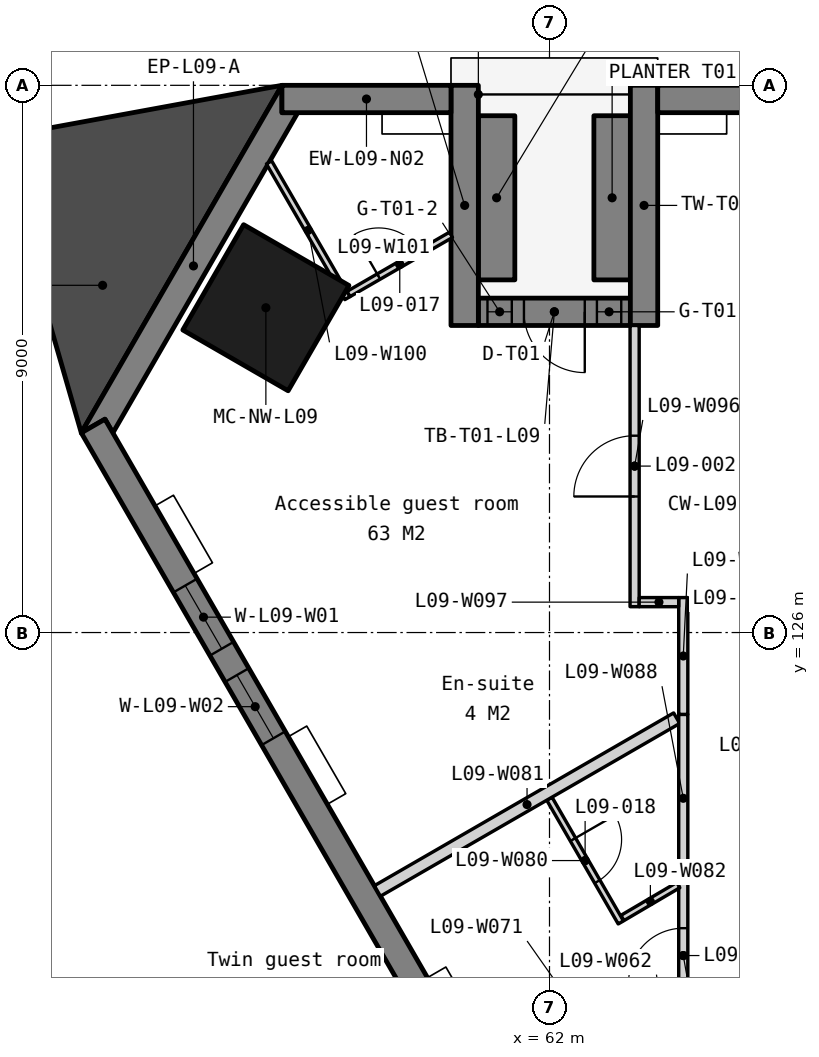
"""IFC4 building model, lengths in metres.
Left out: names, types, materials, properties, quantities, classifications, styles, units other than length and angle.
Written with IfcOpenShell. Run it as: python <this file> out.ifc"""

import sys

from ifc_helpers import new_model, si_unit, direction, frame, frame_2d, origin, origin_2d, place, context, subcontext, project, spatial, polyline, rectangle, outline, extrude, element, fill, save


model = new_model("IFC4")
c1 = context("Model", 3, precision=1e-05, world=origin(), true_north=direction((0.0, 1.0)))
c2 = subcontext(c1, "Body", "Model", "MODEL_VIEW")
j1 = project(units=[si_unit("LENGTHUNIT", "METRE"), si_unit("PLANEANGLEUNIT", "RADIAN")], contexts=[c1])
p1 = place(None, origin())
s1 = spatial("IfcSite", under=j1, at=p1, CompositionType="ELEMENT")
p2 = place(p1, origin())
s2 = spatial("IfcBuilding", under=s1, at=p2, CompositionType="ELEMENT")
p3 = place(p2, frame((0.0, 0.0, 45.5)))
s3 = spatial("IfcBuildingStorey", under=s2, at=p3, CompositionType="ELEMENT", Elevation=45.5)
p4 = place(p3, frame((57.336, 131.342, 0.0), z_axis=(0.0, 0.0, 1.0), x_axis=(-0.5, -0.866025403784, 0.0)))
e1 = element("IfcColumn", 1, at=p4, inside=s3, PredefinedType="COLUMN", context=c2, shape_type="SweptSolid", body=[
    extrude(rectangle(XDim=2.0, YDim=2.0, at=origin_2d()), origin(), (0.0, 0.0, 1.0), 3.5),
])
p5 = place(p3, frame((0.0, 0.0, -0.15)))
e2 = element("IfcWall", 2, at=p5, inside=s3, PredefinedType="SOLIDWALL", context=c2, shape_type="SweptSolid", body=[
    extrude(outline(polyline([(57.6, 135.0), (57.6, 134.55), (57.86, 134.55), (54.82, 129.284), (54.69, 129.509), (54.3, 129.284), (57.6, 135.0)])), origin(), (0.0, 0.0, 1.0), 3.5),
])
p6 = place(p3, frame((102.4, 134.775, -0.15), z_axis=(0.0, 0.0, 1.0), x_axis=(-1.0, 0.0, 0.0)))
e3 = element("IfcWall", 3, at=p6, inside=s3, PredefinedType="SOLIDWALL", context=c2, shape_type="SweptSolid", body=[
    extrude(outline(polyline([(0.0, 0.0), (0.0, 3.5), (38.62, 3.5), (38.62, 0.0), (0.0, 0.0)])), frame((0.0, 0.225, 0.0), z_axis=(0.0, -1.0, 0.0), x_axis=(1.0, 0.0, 0.0)), (0.0, 0.0, 1.0), 0.45),
])
p7 = place(p6, frame((3.03, 0.0, 1.05)))
e4 = element("IfcOpeningElement", 4, at=p7, cuts=e3, PredefinedType="OPENING", context=c2, shape_type="SweptSolid", body=[
    extrude(rectangle(XDim=1.2, YDim=1.5, at=frame_2d((0.6, 0.75))), frame((0.0, 0.235, 0.0), z_axis=(0.0, -1.0, 0.0), x_axis=(1.0, 0.0, 0.0)), (0.0, 0.0, 1.0), 0.47),
])
p8 = place(p6, frame((4.73, 0.0, 1.05)))
e5 = element("IfcOpeningElement", 5, at=p8, cuts=e3, PredefinedType="OPENING", context=c2, shape_type="SweptSolid", body=[
    extrude(rectangle(XDim=1.2, YDim=1.5, at=frame_2d((0.6, 0.75))), frame((0.0, 0.235, 0.0), z_axis=(0.0, -1.0, 0.0), x_axis=(1.0, 0.0, 0.0)), (0.0, 0.0, 1.0), 0.47),
])
p9 = place(p6, frame((11.99, 0.0, 1.05)))
e6 = element("IfcOpeningElement", 6, at=p9, cuts=e3, PredefinedType="OPENING", context=c2, shape_type="SweptSolid", body=[
    extrude(rectangle(XDim=1.2, YDim=1.5, at=frame_2d((0.6, 0.75))), frame((0.0, 0.235, 0.0), z_axis=(0.0, -1.0, 0.0), x_axis=(1.0, 0.0, 0.0)), (0.0, 0.0, 1.0), 0.47),
])
p10 = place(p6, frame((13.69, 0.0, 1.05)))
e7 = element("IfcOpeningElement", 7, at=p10, cuts=e3, PredefinedType="OPENING", context=c2, shape_type="SweptSolid", body=[
    extrude(rectangle(XDim=1.2, YDim=1.5, at=frame_2d((0.6, 0.75))), frame((0.0, 0.235, 0.0), z_axis=(0.0, -1.0, 0.0), x_axis=(1.0, 0.0, 0.0)), (0.0, 0.0, 1.0), 0.47),
])
p11 = place(p6, frame((20.95, 0.0, 1.05)))
e8 = element("IfcOpeningElement", 8, at=p11, cuts=e3, PredefinedType="OPENING", context=c2, shape_type="SweptSolid", body=[
    extrude(rectangle(XDim=1.2, YDim=1.5, at=frame_2d((0.6, 0.75))), frame((0.0, 0.235, 0.0), z_axis=(0.0, -1.0, 0.0), x_axis=(1.0, 0.0, 0.0)), (0.0, 0.0, 1.0), 0.47),
])
p12 = place(p6, frame((22.65, 0.0, 1.05)))
e9 = element("IfcOpeningElement", 9, at=p12, cuts=e3, PredefinedType="OPENING", context=c2, shape_type="SweptSolid", body=[
    extrude(rectangle(XDim=1.2, YDim=1.5, at=frame_2d((0.6, 0.75))), frame((0.0, 0.235, 0.0), z_axis=(0.0, -1.0, 0.0), x_axis=(1.0, 0.0, 0.0)), (0.0, 0.0, 1.0), 0.47),
])
p13 = place(p6, frame((29.91, 0.0, 1.05)))
e10 = element("IfcOpeningElement", 10, at=p13, cuts=e3, PredefinedType="OPENING", context=c2, shape_type="SweptSolid", body=[
    extrude(rectangle(XDim=1.2, YDim=1.5, at=frame_2d((0.6, 0.75))), frame((0.0, 0.235, 0.0), z_axis=(0.0, -1.0, 0.0), x_axis=(1.0, 0.0, 0.0)), (0.0, 0.0, 1.0), 0.47),
])
p14 = place(p6, frame((31.61, 0.0, 1.05)))
e11 = element("IfcOpeningElement", 11, at=p14, cuts=e3, PredefinedType="OPENING", context=c2, shape_type="SweptSolid", body=[
    extrude(rectangle(XDim=1.2, YDim=1.5, at=frame_2d((0.6, 0.75))), frame((0.0, 0.235, 0.0), z_axis=(0.0, -1.0, 0.0), x_axis=(1.0, 0.0, 0.0)), (0.0, 0.0, 1.0), 0.47),
])
p15 = place(p3, frame((60.38, 134.775, -0.15), z_axis=(0.0, 0.0, 1.0), x_axis=(-1.0, 0.0, 0.0)))
e12 = element("IfcWall", 12, at=p15, inside=s3, PredefinedType="SOLIDWALL", context=c2, shape_type="SweptSolid", body=[
    extrude(outline(polyline([(2.78, 3.5), (2.78, 0.0), (0.0, 0.0), (0.0, 3.5), (2.78, 3.5)])), frame((0.0, 0.225, 0.0), z_axis=(0.0, -1.0, 0.0), x_axis=(1.0, 0.0, 0.0)), (0.0, 0.0, 1.0), 0.45),
])
p16 = place(p3, frame((54.495, 129.397, -0.15), z_axis=(0.0, 0.0, 1.0), x_axis=(0.499999201451, -0.866025864826, 0.0)))
e13 = element("IfcWall", 13, at=p16, inside=s3, PredefinedType="SOLIDWALL", context=c2, shape_type="SweptSolid", body=[
    extrude(outline(polyline([(44.8, 0.0), (44.8, 3.5), (0.0, 3.5), (0.0, 0.0), (44.8, 0.0)])), frame((0.0, 0.225, 0.0), z_axis=(0.0, -1.0, 0.0), x_axis=(1.0, 0.0, 0.0)), (0.0, 0.0, 1.0), 0.45),
])
p17 = place(p16, frame((3.03, 0.0, 1.05)))
e14 = element("IfcOpeningElement", 14, at=p17, cuts=e13, PredefinedType="OPENING", context=c2, shape_type="SweptSolid", body=[
    extrude(rectangle(XDim=1.2, YDim=1.5, at=frame_2d((0.6, 0.75))), frame((0.0, 0.235, 0.0), z_axis=(0.0, -1.0, 0.0), x_axis=(1.0, 0.0, 0.0)), (0.0, 0.0, 1.0), 0.47),
])
p18 = place(p16, frame((4.73, 0.0, 1.05)))
e15 = element("IfcOpeningElement", 15, at=p18, cuts=e13, PredefinedType="OPENING", context=c2, shape_type="SweptSolid", body=[
    extrude(rectangle(XDim=1.2, YDim=1.5, at=frame_2d((0.6, 0.75))), frame((0.0, 0.235, 0.0), z_axis=(0.0, -1.0, 0.0), x_axis=(1.0, 0.0, 0.0)), (0.0, 0.0, 1.0), 0.47),
])
p19 = place(p16, frame((11.99, 0.0, 1.05)))
e16 = element("IfcOpeningElement", 16, at=p19, cuts=e13, PredefinedType="OPENING", context=c2, shape_type="SweptSolid", body=[
    extrude(rectangle(XDim=1.2, YDim=1.5, at=frame_2d((0.6, 0.75))), frame((0.0, 0.235, 0.0), z_axis=(0.0, -1.0, 0.0), x_axis=(1.0, 0.0, 0.0)), (0.0, 0.0, 1.0), 0.47),
])
p20 = place(p16, frame((13.69, 0.0, 1.05)))
e17 = element("IfcOpeningElement", 17, at=p20, cuts=e13, PredefinedType="OPENING", context=c2, shape_type="SweptSolid", body=[
    extrude(rectangle(XDim=1.2, YDim=1.5, at=frame_2d((0.6, 0.75))), frame((0.0, 0.235, 0.0), z_axis=(0.0, -1.0, 0.0), x_axis=(1.0, 0.0, 0.0)), (0.0, 0.0, 1.0), 0.47),
])
p21 = place(p16, frame((20.95, 0.0, 1.05)))
e18 = element("IfcOpeningElement", 18, at=p21, cuts=e13, PredefinedType="OPENING", context=c2, shape_type="SweptSolid", body=[
    extrude(rectangle(XDim=1.2, YDim=1.5, at=frame_2d((0.6, 0.75))), frame((0.0, 0.235, 0.0), z_axis=(0.0, -1.0, 0.0), x_axis=(1.0, 0.0, 0.0)), (0.0, 0.0, 1.0), 0.47),
])
p22 = place(p16, frame((22.65, 0.0, 1.05)))
e19 = element("IfcOpeningElement", 19, at=p22, cuts=e13, PredefinedType="OPENING", context=c2, shape_type="SweptSolid", body=[
    extrude(rectangle(XDim=1.2, YDim=1.5, at=frame_2d((0.6, 0.75))), frame((0.0, 0.235, 0.0), z_axis=(0.0, -1.0, 0.0), x_axis=(1.0, 0.0, 0.0)), (0.0, 0.0, 1.0), 0.47),
])
p23 = place(p16, frame((29.91, 0.0, 1.05)))
e20 = element("IfcOpeningElement", 20, at=p23, cuts=e13, PredefinedType="OPENING", context=c2, shape_type="SweptSolid", body=[
    extrude(rectangle(XDim=1.2, YDim=1.5, at=frame_2d((0.6, 0.75))), frame((0.0, 0.235, 0.0), z_axis=(0.0, -1.0, 0.0), x_axis=(1.0, 0.0, 0.0)), (0.0, 0.0, 1.0), 0.47),
])
p24 = place(p16, frame((31.61, 0.0, 1.05)))
e21 = element("IfcOpeningElement", 21, at=p24, cuts=e13, PredefinedType="OPENING", context=c2, shape_type="SweptSolid", body=[
    extrude(rectangle(XDim=1.2, YDim=1.5, at=frame_2d((0.6, 0.75))), frame((0.0, 0.235, 0.0), z_axis=(0.0, -1.0, 0.0), x_axis=(1.0, 0.0, 0.0)), (0.0, 0.0, 1.0), 0.47),
])
p25 = place(p16, frame((38.87, 0.0, 1.05)))
e22 = element("IfcOpeningElement", 22, at=p25, cuts=e13, PredefinedType="OPENING", context=c2, shape_type="SweptSolid", body=[
    extrude(rectangle(XDim=1.2, YDim=1.5, at=frame_2d((0.6, 0.75))), frame((0.0, 0.235, 0.0), z_axis=(0.0, -1.0, 0.0), x_axis=(1.0, 0.0, 0.0)), (0.0, 0.0, 1.0), 0.47),
])
p26 = place(p16, frame((40.57, 0.0, 1.05)))
e23 = element("IfcOpeningElement", 23, at=p26, cuts=e13, PredefinedType="OPENING", context=c2, shape_type="SweptSolid", body=[
    extrude(rectangle(XDim=1.2, YDim=1.5, at=frame_2d((0.6, 0.75))), frame((0.0, 0.235, 0.0), z_axis=(0.0, -1.0, 0.0), x_axis=(1.0, 0.0, 0.0)), (0.0, 0.0, 1.0), 0.47),
])
for number, where, z_axis, x_axis in (
    (24, (63.555, 135.0, 0.0), (0.0, 0.0, 1.0), (0.0, -1.0, 0.0)),
    (25, (60.605, 135.0, 0.0), (0.0, 0.0, 1.0), (0.0, -1.0, 0.0)),
):
    element("IfcWall", number, at=place(p3, frame(where, z_axis=z_axis, x_axis=x_axis)), inside=s3, PredefinedType="SOLIDWALL", context=c2, shape_type="SweptSolid", body=[
        extrude(rectangle(XDim=3.95, YDim=0.45, at=frame_2d((1.975, 0.0))), origin(), (0.0, 0.0, 1.0), 6.85),
    ])
p27 = place(p3, frame((63.33, 131.275, -0.15), z_axis=(0.0, 0.0, 1.0), x_axis=(-1.0, 0.0, 0.0)))
e26 = element("IfcWall", 26, at=p27, inside=s3, PredefinedType="SOLIDWALL", context=c2, shape_type="SweptSolid", body=[
    extrude(rectangle(XDim=2.5, YDim=0.45, at=frame_2d((1.25, 0.0))), origin(), (0.0, 0.0, 1.0), 3.097),
])
p28 = place(p27, frame((0.75, 0.0, 0.15)))
e27 = element("IfcOpeningElement", 27, at=p28, cuts=e26, PredefinedType="OPENING", context=c2, shape_type="SweptSolid", body=[
    extrude(rectangle(XDim=1.0, YDim=2.4, at=frame_2d((0.5, 1.2))), frame((0.0, 0.235, 0.0), z_axis=(0.0, -1.0, 0.0), x_axis=(1.0, 0.0, 0.0)), (0.0, 0.0, 1.0), 0.47),
])
p29 = place(p27, frame((0.15, 0.0, 0.15)))
e28 = element("IfcOpeningElement", 28, at=p29, cuts=e26, PredefinedType="OPENING", context=c2, shape_type="SweptSolid", body=[
    extrude(rectangle(XDim=0.4, YDim=2.4, at=frame_2d((0.2, 1.2))), frame((0.0, 0.235, 0.0), z_axis=(0.0, -1.0, 0.0), x_axis=(1.0, 0.0, 0.0)), (0.0, 0.0, 1.0), 0.47),
])
p30 = place(p27, frame((1.95, 0.0, 0.15)))
e29 = element("IfcOpeningElement", 29, at=p30, cuts=e26, PredefinedType="OPENING", context=c2, shape_type="SweptSolid", body=[
    extrude(rectangle(XDim=0.4, YDim=2.4, at=frame_2d((0.2, 1.2))), frame((0.0, 0.235, 0.0), z_axis=(0.0, -1.0, 0.0), x_axis=(1.0, 0.0, 0.0)), (0.0, 0.0, 1.0), 0.47),
])
for number, where, z_axis, x_axis in (
    (30, (63.03, 134.5, 0.0), (0.0, 0.0, 1.0), (0.0, -1.0, 0.0)),
    (31, (61.13, 134.5, 0.0), (0.0, 0.0, 1.0), (0.0, -1.0, 0.0)),
):
    element("IfcWall", number, at=place(p3, frame(where, z_axis=z_axis, x_axis=x_axis)), inside=s3, PredefinedType="STANDARD", context=c2, shape_type="SweptSolid", body=[
        extrude(rectangle(XDim=2.7, YDim=0.6, at=frame_2d((1.35, 0.0))), origin(), (0.0, 0.0, 1.0), 0.6),
    ])
p31 = place(p3, frame((0.0, 0.0, -0.15)))
e32 = element("IfcWall", 32, at=p31, inside=s3, PredefinedType="SOLIDWALL", context=c2, shape_type="SweptSolid", body=[
    extrude(outline(polyline([(57.6, 135.0), (52.9, 134.137), (54.3, 129.284), (57.6, 135.0)])), origin(), (0.0, 0.0, 1.0), 3.5),
])
p32 = place(p3, frame((64.2, 119.481, 0.0), z_axis=(0.0, 0.0, 1.0), x_axis=(0.0, 1.0, 0.0)))
e33 = element("IfcWall", 33, at=p32, inside=s3, PredefinedType="PARTITIONING", context=c2, shape_type="SweptSolid", body=[
    extrude(rectangle(XDim=2.413, YDim=0.15, at=frame_2d((1.207, 0.0))), origin(), (0.0, 0.0, 1.0), 3.35),
])
p33 = place(p32, frame((0.757, 0.0, 0.0)))
e34 = element("IfcOpeningElement", 34, at=p33, cuts=e33, PredefinedType="OPENING", context=c2, shape_type="SweptSolid", body=[
    extrude(rectangle(XDim=0.9, YDim=2.1, at=frame_2d((0.45, 1.05))), frame((0.0, 0.085, 0.0), z_axis=(0.0, -1.0, 0.0), x_axis=(1.0, 0.0, 0.0)), (0.0, 0.0, 1.0), 0.17),
])
p34 = place(p3, frame((61.998, 123.267, 0.0), z_axis=(0.0, 0.0, 1.0), x_axis=(0.500016218704, -0.866016039709, 0.0)))
e35 = element("IfcWall", 35, at=p34, inside=s3, PredefinedType="PARTITIONING", context=c2, shape_type="SweptSolid", body=[
    extrude(rectangle(XDim=2.35, YDim=0.1, at=frame_2d((1.175, 0.0))), origin(), (0.0, 0.0, 1.0), 3.35),
])
p35 = place(p34, frame((0.775, 0.0, 0.0)))
e36 = element("IfcOpeningElement", 36, at=p35, cuts=e35, PredefinedType="OPENING", context=c2, shape_type="SweptSolid", body=[
    extrude(rectangle(XDim=0.8, YDim=2.1, at=frame_2d((0.4, 1.05))), frame((0.0, 0.06, 0.0), z_axis=(0.0, -1.0, 0.0), x_axis=(1.0, 0.0, 0.0)), (0.0, 0.0, 1.0), 0.12),
])
p36 = place(p3, frame((59.17, 121.75, 0.0), z_axis=(0.0, 0.0, 1.0), x_axis=(0.866043237112, 0.499969110498, 0.0)))
e37 = element("IfcWall", 37, at=p36, inside=s3, PredefinedType="PARTITIONING", context=c2, shape_type="SweptSolid", body=[
    extrude(rectangle(XDim=5.683, YDim=0.2, at=frame_2d((2.842, 0.0))), origin(), (0.0, 0.0, 1.0), 3.35),
])
p37 = place(p3, frame((63.2, 121.306, 0.0), z_axis=(0.0, 0.0, 1.0), x_axis=(0.86196956313, 0.506960030216, 0.0)))
e38 = element("IfcWall", 38, at=p37, inside=s3, PredefinedType="PARTITIONING", context=c2, shape_type="SweptSolid", body=[
    extrude(rectangle(XDim=1.065, YDim=0.1, at=frame_2d((0.533, 0.0))), origin(), (0.0, 0.0, 1.0), 3.35),
])
p38 = place(p3, frame((64.2, 121.894, 0.0), z_axis=(0.0, 0.0, 1.0), x_axis=(0.0, 1.0, 0.0)))
e39 = element("IfcWall", 39, at=p38, inside=s3, PredefinedType="PARTITIONING", context=c2, shape_type="SweptSolid", body=[
    extrude(rectangle(XDim=2.76, YDim=0.15, at=frame_2d((1.38, 0.0))), origin(), (0.0, 0.0, 1.0), 3.35),
])
p39 = place(p3, frame((64.2, 124.654, 0.0), z_axis=(0.0, 0.0, 1.0), x_axis=(0.0, 1.0, 0.0)))
e40 = element("IfcWall", 40, at=p39, inside=s3, PredefinedType="PARTITIONING", context=c2, shape_type="SweptSolid", body=[
    extrude(rectangle(XDim=1.921, YDim=0.15, at=frame_2d((0.96, 0.0))), origin(), (0.0, 0.0, 1.0), 3.35),
])
p40 = place(p3, frame((63.4, 126.425, 0.0), z_axis=(0.0, 0.0, 1.0), x_axis=(0.0, 1.0, 0.0)))
e41 = element("IfcWall", 41, at=p40, inside=s3, PredefinedType="PARTITIONING", context=c2, shape_type="SweptSolid", body=[
    extrude(rectangle(XDim=4.625, YDim=0.15, at=frame_2d((2.312, 0.0))), origin(), (0.0, 0.0, 1.0), 3.35),
])
p41 = place(p40, frame((1.812, 0.0, 0.0)))
e42 = element("IfcOpeningElement", 42, at=p41, cuts=e41, PredefinedType="OPENING", context=c2, shape_type="SweptSolid", body=[
    extrude(rectangle(XDim=1.0, YDim=2.1, at=frame_2d((0.5, 1.05))), frame((0.0, 0.085, 0.0), z_axis=(0.0, -1.0, 0.0), x_axis=(1.0, 0.0, 0.0)), (0.0, 0.0, 1.0), 0.17),
])
p42 = place(p3, frame((63.475, 126.5, 0.0), z_axis=(0.0, 0.0, 1.0), x_axis=(1.0, 0.0, 0.0)))
e43 = element("IfcWall", 43, at=p42, inside=s3, PredefinedType="PARTITIONING", context=c2, shape_type="SweptSolid", body=[
    extrude(rectangle(XDim=0.65, YDim=0.15, at=frame_2d((0.325, 0.0))), origin(), (0.0, 0.0, 1.0), 3.35),
])
p43 = place(p3, frame((57.388, 133.733, 0.0), z_axis=(0.0, 0.0, 1.0), x_axis=(0.499938331893, -0.866061004955, 0.0)))
e44 = element("IfcWall", 44, at=p43, inside=s3, PredefinedType="PARTITIONING", context=c2, shape_type="SweptSolid", body=[
    extrude(rectangle(XDim=2.578, YDim=0.1, at=frame_2d((1.289, 0.0))), origin(), (0.0, 0.0, 1.0), 3.35),
])
p44 = place(p3, frame((58.695, 131.568, 0.0), z_axis=(0.0, 0.0, 1.0), x_axis=(0.865987050215, 0.500066424447, 0.0)))
e45 = element("IfcWall", 45, at=p44, inside=s3, PredefinedType="PARTITIONING", context=c2, shape_type="SweptSolid", body=[
    extrude(rectangle(XDim=1.946, YDim=0.1, at=frame_2d((0.973, 0.0))), origin(), (0.0, 0.0, 1.0), 3.35),
])
p45 = place(p44, frame((0.573, 0.0, 0.0)))
e46 = element("IfcOpeningElement", 46, at=p45, cuts=e45, PredefinedType="OPENING", context=c2, shape_type="SweptSolid", body=[
    extrude(rectangle(XDim=0.8, YDim=2.1, at=frame_2d((0.4, 1.05))), frame((0.0, 0.06, 0.0), z_axis=(0.0, -1.0, 0.0), x_axis=(1.0, 0.0, 0.0)), (0.0, 0.0, 1.0), 0.12),
])
p46 = place(p17, origin())
e47 = element("IfcWindow", 47, at=p46, inside=s3, PartitioningType="SINGLE_PANEL", PredefinedType="WINDOW", context=c2, shape_type="SweptSolid", body=[
    extrude(rectangle(XDim=1.2, YDim=1.5, at=frame_2d((0.6, 0.75))), frame((0.0, 0.03, 0.0), z_axis=(0.0, -1.0, 0.0), x_axis=(1.0, 0.0, 0.0)), (0.0, 0.0, 1.0), 0.06),
])
fill(e14, e47)
p47 = place(p18, origin())
e48 = element("IfcWindow", 48, at=p47, inside=s3, PartitioningType="SINGLE_PANEL", PredefinedType="WINDOW", context=c2, shape_type="SweptSolid", body=[
    extrude(rectangle(XDim=1.2, YDim=1.5, at=frame_2d((0.6, 0.75))), frame((0.0, 0.03, 0.0), z_axis=(0.0, -1.0, 0.0), x_axis=(1.0, 0.0, 0.0)), (0.0, 0.0, 1.0), 0.06),
])
fill(e15, e48)
p48 = place(p28, origin())
e49 = element("IfcDoor", 49, at=p48, inside=s3, OperationType="SINGLE_SWING_LEFT", PredefinedType="DOOR", context=c2, shape_type="SweptSolid", body=[
    extrude(rectangle(XDim=1.0, YDim=2.4, at=frame_2d((0.5, 1.2))), frame((0.0, 0.025, 0.0), z_axis=(0.0, -1.0, 0.0), x_axis=(1.0, 0.0, 0.0)), (0.0, 0.0, 1.0), 0.05),
])
fill(e27, e49)
p49 = place(p29, origin())
e50 = element("IfcWindow", 50, at=p49, inside=s3, PartitioningType="SINGLE_PANEL", PredefinedType="WINDOW", context=c2, shape_type="SweptSolid", body=[
    extrude(rectangle(XDim=0.4, YDim=2.4, at=frame_2d((0.2, 1.2))), frame((0.0, 0.03, 0.0), z_axis=(0.0, -1.0, 0.0), x_axis=(1.0, 0.0, 0.0)), (0.0, 0.0, 1.0), 0.06),
])
fill(e28, e50)
p50 = place(p30, origin())
e51 = element("IfcWindow", 51, at=p50, inside=s3, PartitioningType="SINGLE_PANEL", PredefinedType="WINDOW", context=c2, shape_type="SweptSolid", body=[
    extrude(rectangle(XDim=0.4, YDim=2.4, at=frame_2d((0.2, 1.2))), frame((0.0, 0.03, 0.0), z_axis=(0.0, -1.0, 0.0), x_axis=(1.0, 0.0, 0.0)), (0.0, 0.0, 1.0), 0.06),
])
fill(e29, e51)
p51 = place(p41, origin())
e52 = element("IfcDoor", 52, at=p51, inside=s3, OperationType="SINGLE_SWING_LEFT", PredefinedType="DOOR", context=c2, shape_type="SweptSolid", body=[
    extrude(rectangle(XDim=1.0, YDim=2.1, at=frame_2d((0.5, 1.05))), frame((0.0, 0.025, 0.0), z_axis=(0.0, -1.0, 0.0), x_axis=(1.0, 0.0, 0.0)), (0.0, 0.0, 1.0), 0.05),
])
fill(e42, e52)
p52 = place(p33, origin())
e53 = element("IfcDoor", 53, at=p52, inside=s3, OperationType="SINGLE_SWING_LEFT", PredefinedType="DOOR", context=c2, shape_type="SweptSolid", body=[
    extrude(rectangle(XDim=0.9, YDim=2.1, at=frame_2d((0.45, 1.05))), frame((0.0, 0.025, 0.0), z_axis=(0.0, -1.0, 0.0), x_axis=(1.0, 0.0, 0.0)), (0.0, 0.0, 1.0), 0.05),
])
fill(e34, e53)
p53 = place(p45, origin())
e54 = element("IfcDoor", 54, at=p53, inside=s3, OperationType="SINGLE_SWING_LEFT", PredefinedType="DOOR", context=c2, shape_type="SweptSolid", body=[
    extrude(rectangle(XDim=0.8, YDim=2.1, at=frame_2d((0.4, 1.05))), frame((0.0, 0.025, 0.0), z_axis=(0.0, -1.0, 0.0), x_axis=(1.0, 0.0, 0.0)), (0.0, 0.0, 1.0), 0.05),
])
fill(e46, e54)
p54 = place(p35, origin())
e55 = element("IfcDoor", 55, at=p54, inside=s3, OperationType="SINGLE_SWING_LEFT", PredefinedType="DOOR", context=c2, shape_type="SweptSolid", body=[
    extrude(rectangle(XDim=0.8, YDim=2.1, at=frame_2d((0.4, 1.05))), frame((0.0, 0.025, 0.0), z_axis=(0.0, -1.0, 0.0), x_axis=(1.0, 0.0, 0.0)), (0.0, 0.0, 1.0), 0.05),
])
fill(e36, e55)
save(model, sys.argv[1])
